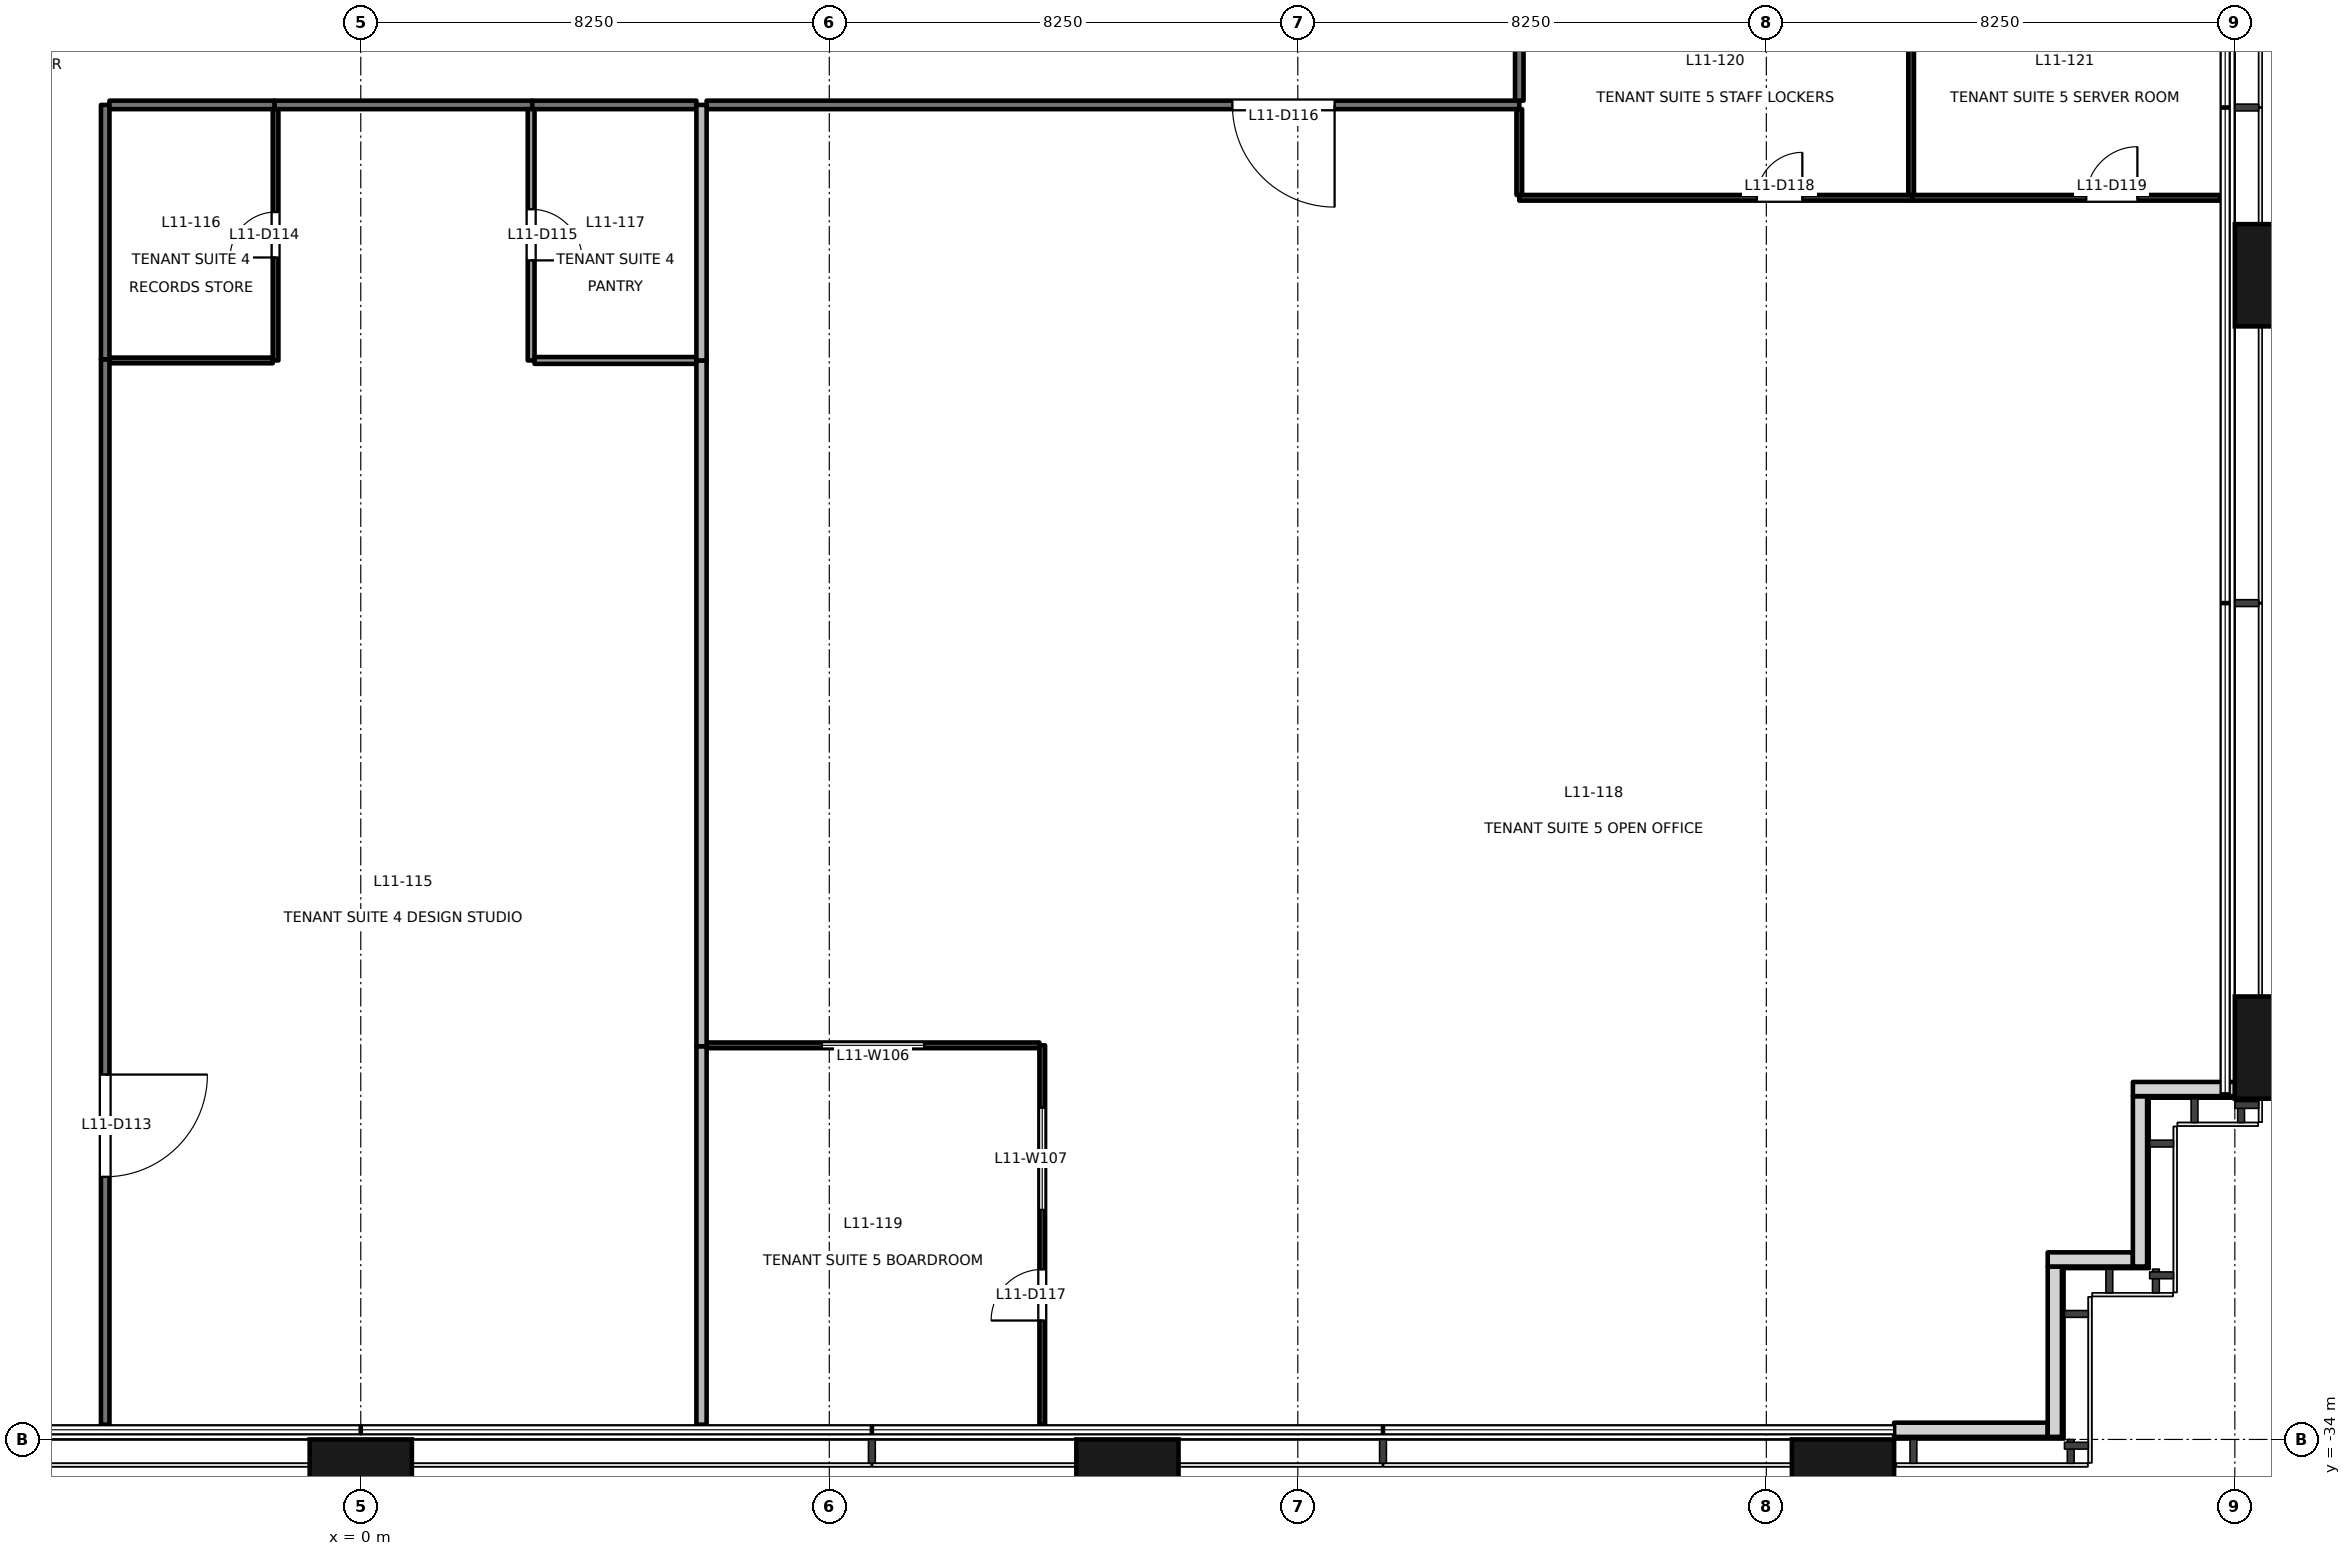
"""IFC4 building model, lengths in metres.
Left out: names, types, materials, properties, quantities, classifications, styles, units other than length and angle.
Written with IfcOpenShell. Run it as: python <this file> out.ifc"""

import sys

from ifc_helpers import new_model, si_unit, direction, frame, frame_2d, origin, origin_2d, place, context, subcontext, project, spatial, rectangle, extrude, element, fill, save


model = new_model("IFC4")
c1 = context("Model", 3, precision=1e-05, world=origin(), true_north=direction((0.0, 1.0)))
c2 = subcontext(c1, "Body", "Model", "MODEL_VIEW")
j1 = project(units=[si_unit("LENGTHUNIT", "METRE"), si_unit("PLANEANGLEUNIT", "RADIAN")], contexts=[c1])
p1 = place(None, origin())
s1 = spatial("IfcSite", under=j1, at=p1, CompositionType="ELEMENT")
p2 = place(p1, origin())
s2 = spatial("IfcBuilding", under=s1, at=p2, CompositionType="ELEMENT")
p3 = place(p2, frame((0.0, 0.0, 52.9)))
s3 = spatial("IfcBuildingStorey", under=s2, at=p3, CompositionType="ELEMENT", Elevation=52.9)
for number, where, z_axis, x_axis in (
    (1, (0.0, -34.9, -0.2), (0.0, 0.0, 1.0), (1.0, 0.0, 0.0)),
    (2, (13.5, -34.9, -0.2), (0.0, 0.0, 1.0), (1.0, 0.0, 0.0)),
    (3, (26.1, -34.9, -0.2), (0.0, 0.0, 1.0), (1.0, 0.0, 0.0)),
    (4, (33.9, -27.1, -0.2), (0.0, 0.0, 1.0), (0.0, 1.0, 0.0)),
    (5, (33.9, -13.5, -0.2), (0.0, 0.0, 1.0), (0.0, 1.0, 0.0)),
):
    element("IfcColumn", number, at=place(p3, frame(where, z_axis=z_axis, x_axis=x_axis)), inside=s3, PredefinedType="COLUMN", context=c2, shape_type="SweptSolid", body=[
        extrude(rectangle(XDim=1.8, YDim=1.8, at=origin_2d()), origin(), (0.0, 0.0, 1.0), 4.1),
    ])
p4 = place(p3, frame((27.0, -33.83, 0.0), z_axis=(0.0, 0.0, 1.0), x_axis=(1.0, 0.0, 0.0)))
e6 = element("IfcWall", 6, at=p4, inside=s3, PredefinedType="SOLIDWALL", context=c2, shape_type="SweptSolid", body=[
    extrude(rectangle(XDim=2.705, YDim=0.25, at=frame_2d((1.353, 0.0))), origin(), (0.0, 0.0, 1.0), 3.9),
])
p5 = place(p3, frame((29.83, -33.955, 0.0), z_axis=(0.0, 0.0, 1.0), x_axis=(0.0, 1.0, 0.0)))
e7 = element("IfcWall", 7, at=p5, inside=s3, PredefinedType="SOLIDWALL", context=c2, shape_type="SweptSolid", body=[
    extrude(rectangle(XDim=3.0, YDim=0.25, at=frame_2d((1.5, 0.0))), origin(), (0.0, 0.0, 1.0), 3.9),
])
p6 = place(p3, frame((29.705, -30.83, 0.0), z_axis=(0.0, 0.0, 1.0), x_axis=(1.0, 0.0, 0.0)))
e8 = element("IfcWall", 8, at=p6, inside=s3, PredefinedType="SOLIDWALL", context=c2, shape_type="SweptSolid", body=[
    extrude(rectangle(XDim=1.5, YDim=0.25, at=frame_2d((0.75, 0.0))), origin(), (0.0, 0.0, 1.0), 3.9),
])
p7 = place(p3, frame((31.33, -30.955, 0.0), z_axis=(0.0, 0.0, 1.0), x_axis=(0.0, 1.0, 0.0)))
e9 = element("IfcWall", 9, at=p7, inside=s3, PredefinedType="SOLIDWALL", context=c2, shape_type="SweptSolid", body=[
    extrude(rectangle(XDim=3.0, YDim=0.25, at=frame_2d((1.5, 0.0))), origin(), (0.0, 0.0, 1.0), 3.9),
])
p8 = place(p3, frame((31.205, -27.83, 0.0), z_axis=(0.0, 0.0, 1.0), x_axis=(1.0, 0.0, 0.0)))
e10 = element("IfcWall", 10, at=p8, inside=s3, PredefinedType="SOLIDWALL", context=c2, shape_type="SweptSolid", body=[
    extrude(rectangle(XDim=1.8, YDim=0.25, at=frame_2d((0.9, 0.0))), origin(), (0.0, 0.0, 1.0), 3.9),
])
p9 = place(p3, frame((-4.5, -14.98, 0.0), z_axis=(0.0, 0.0, 1.0), x_axis=(0.0, -1.0, 0.0)))
e11 = element("IfcWall", 11, at=p9, inside=s3, PredefinedType="PARTITIONING", context=c2, shape_type="SweptSolid", body=[
    extrude(rectangle(XDim=18.76, YDim=0.15, at=frame_2d((9.38, 0.0))), origin(), (0.0, 0.0, 1.0), 2.9),
])
p10 = place(p9, frame((12.595, 0.0, 0.0)))
e12 = element("IfcOpeningElement", 12, at=p10, cuts=e11, PredefinedType="OPENING", context=c2, shape_type="SweptSolid", body=[
    extrude(rectangle(XDim=1.8, YDim=2.1, at=frame_2d((0.9, 1.05))), frame((0.0, 0.085, 0.0), z_axis=(0.0, -1.0, 0.0), x_axis=(1.0, 0.0, 0.0)), (0.0, 0.0, 1.0), 0.171),
])
p11 = place(p3, frame((3.02, -10.5, 0.0), z_axis=(0.0, 0.0, 1.0), x_axis=(-1.0, 0.0, 0.0)))
e13 = element("IfcWall", 13, at=p11, inside=s3, PredefinedType="PARTITIONING", context=c2, shape_type="SweptSolid", body=[
    extrude(rectangle(XDim=4.54, YDim=0.15, at=frame_2d((2.27, 0.0))), origin(), (0.0, 0.0, 1.0), 2.9),
])
p12 = place(p3, frame((-4.5, -10.5, 0.0), z_axis=(0.0, 0.0, 1.0), x_axis=(0.0, -1.0, 0.0)))
e14 = element("IfcWall", 14, at=p12, inside=s3, PredefinedType="PARTITIONING", context=c2, shape_type="SweptSolid", body=[
    extrude(rectangle(XDim=4.48, YDim=0.15, at=frame_2d((2.24, 0.0))), origin(), (0.0, 0.0, 1.0), 2.9),
])
p13 = place(p3, frame((-1.52, -10.5, 0.0), z_axis=(0.0, 0.0, 1.0), x_axis=(-1.0, 0.0, 0.0)))
e15 = element("IfcWall", 15, at=p13, inside=s3, PredefinedType="PARTITIONING", context=c2, shape_type="SweptSolid", body=[
    extrude(rectangle(XDim=2.905, YDim=0.15, at=frame_2d((1.453, 0.0))), origin(), (0.0, 0.0, 1.0), 2.9),
])
p14 = place(p3, frame((5.91, -10.5, 0.0), z_axis=(0.0, 0.0, 1.0), x_axis=(-1.0, 0.0, 0.0)))
e16 = element("IfcWall", 16, at=p14, inside=s3, PredefinedType="PARTITIONING", context=c2, shape_type="SweptSolid", body=[
    extrude(rectangle(XDim=2.89, YDim=0.15, at=frame_2d((1.445, 0.0))), origin(), (0.0, 0.0, 1.0), 2.9),
])
p15 = place(p3, frame((20.4, -10.5, 0.0), z_axis=(0.0, 0.0, 1.0), x_axis=(-1.0, 0.0, 0.0)))
e17 = element("IfcWall", 17, at=p15, inside=s3, PredefinedType="PARTITIONING", context=c2, shape_type="SweptSolid", body=[
    extrude(rectangle(XDim=14.31, YDim=0.15, at=frame_2d((7.155, 0.0))), origin(), (0.0, 0.0, 1.0), 2.5),
])
p16 = place(p15, frame((3.252, 0.0, 0.0)))
e18 = element("IfcOpeningElement", 18, at=p16, cuts=e17, PredefinedType="OPENING", context=c2, shape_type="SweptSolid", body=[
    extrude(rectangle(XDim=1.8, YDim=2.1, at=frame_2d((0.9, 1.05))), frame((0.0, 0.085, 0.0), z_axis=(0.0, -1.0, 0.0), x_axis=(1.0, 0.0, 0.0)), (0.0, 0.0, 1.0), 0.171),
])
p17 = place(p3, frame((20.4, -7.726, 0.0), z_axis=(0.0, 0.0, 1.0), x_axis=(0.0, -1.0, 0.0)))
e19 = element("IfcWall", 19, at=p17, inside=s3, PredefinedType="PARTITIONING", context=c2, shape_type="SweptSolid", body=[
    extrude(rectangle(XDim=2.699, YDim=0.15, at=frame_2d((1.35, 0.0))), origin(), (0.0, 0.0, 1.0), 3.3),
])
p18 = place(p3, frame((-4.425, -15.0, 0.0), z_axis=(0.0, 0.0, 1.0), x_axis=(1.0, 0.0, 0.0)))
e20 = element("IfcWall", 20, at=p18, inside=s3, PredefinedType="PARTITIONING", context=c2, shape_type="SweptSolid", body=[
    extrude(rectangle(XDim=2.875, YDim=0.1, at=frame_2d((1.438, 0.0))), origin(), (0.0, 0.0, 1.0), 2.9),
])
p19 = place(p3, frame((-1.5, -15.0, 0.0), z_axis=(0.0, 0.0, 1.0), x_axis=(0.0, 1.0, 0.0)))
e21 = element("IfcWall", 21, at=p19, inside=s3, PredefinedType="PARTITIONING", context=c2, shape_type="SweptSolid", body=[
    extrude(rectangle(XDim=4.425, YDim=0.1, at=frame_2d((2.212, 0.0))), origin(), (0.0, 0.0, 1.0), 3.9),
])
p20 = place(p19, frame((1.813, 0.0, 0.0)))
e22 = element("IfcOpeningElement", 22, at=p20, cuts=e21, PredefinedType="OPENING", context=c2, shape_type="SweptSolid", body=[
    extrude(rectangle(XDim=0.8, YDim=2.1, at=frame_2d((0.4, 1.05))), frame((0.0, 0.061, 0.0), z_axis=(0.0, -1.0, 0.0), x_axis=(1.0, 0.0, 0.0)), (0.0, 0.0, 1.0), 0.121),
])
p21 = place(p3, frame((3.0, -10.575, 0.0), z_axis=(0.0, 0.0, 1.0), x_axis=(0.0, -1.0, 0.0)))
e23 = element("IfcWall", 23, at=p21, inside=s3, PredefinedType="PARTITIONING", context=c2, shape_type="SweptSolid", body=[
    extrude(rectangle(XDim=4.425, YDim=0.12, at=frame_2d((2.212, 0.0))), origin(), (0.0, 0.0, 1.0), 3.9),
])
p22 = place(p21, frame((1.763, 0.0, 0.0)))
e24 = element("IfcOpeningElement", 24, at=p22, cuts=e23, PredefinedType="OPENING", context=c2, shape_type="SweptSolid", body=[
    extrude(rectangle(XDim=0.9, YDim=2.1, at=frame_2d((0.45, 1.05))), frame((0.0, 0.071, 0.0), z_axis=(0.0, -1.0, 0.0), x_axis=(1.0, 0.0, 0.0)), (0.0, 0.0, 1.0), 0.141),
])
p23 = place(p3, frame((3.06, -15.0, 0.0), z_axis=(0.0, 0.0, 1.0), x_axis=(1.0, 0.0, 0.0)))
e25 = element("IfcWall", 25, at=p23, inside=s3, PredefinedType="PARTITIONING", context=c2, shape_type="SweptSolid", body=[
    extrude(rectangle(XDim=2.85, YDim=0.12, at=frame_2d((1.425, 0.0))), origin(), (0.0, 0.0, 1.0), 2.9),
])
p24 = place(p3, frame((6.0, -15.0, 0.0), z_axis=(0.0, 0.0, 1.0), x_axis=(0.0, -1.0, 0.0)))
e26 = element("IfcWall", 26, at=p24, inside=s3, PredefinedType="PARTITIONING", context=c2, shape_type="SweptSolid", body=[
    extrude(rectangle(XDim=12.08, YDim=0.18, at=frame_2d((6.04, 0.0))), origin(), (0.0, 0.0, 1.0), 3.9),
])
p25 = place(p3, frame((6.0, -27.08, 0.0), z_axis=(0.0, 0.0, 1.0), x_axis=(0.0, -1.0, 0.0)))
e27 = element("IfcWall", 27, at=p25, inside=s3, PredefinedType="PARTITIONING", context=c2, shape_type="SweptSolid", body=[
    extrude(rectangle(XDim=6.66, YDim=0.18, at=frame_2d((3.33, 0.0))), origin(), (0.0, 0.0, 1.0), 3.9),
])
p26 = place(p3, frame((6.0, -10.5, 0.0), z_axis=(0.0, 0.0, 1.0), x_axis=(0.0, -1.0, 0.0)))
e28 = element("IfcWall", 28, at=p26, inside=s3, PredefinedType="PARTITIONING", context=c2, shape_type="SweptSolid", body=[
    extrude(rectangle(XDim=4.5, YDim=0.18, at=frame_2d((2.25, 0.0))), origin(), (0.0, 0.0, 1.0), 3.9),
])
p27 = place(p3, frame((11.95, -27.06, 0.0), z_axis=(0.0, 0.0, 1.0), x_axis=(-1.0, 0.0, 0.0)))
e29 = element("IfcWall", 29, at=p27, inside=s3, PredefinedType="PARTITIONING", context=c2, shape_type="SweptSolid", body=[
    extrude(rectangle(XDim=5.86, YDim=0.1, at=frame_2d((2.93, 0.0))), origin(), (0.0, 0.0, 1.0), 2.9),
])
p28 = place(p27, frame((2.03, 0.0, 0.9)))
e30 = element("IfcOpeningElement", 30, at=p28, cuts=e29, PredefinedType="OPENING", context=c2, shape_type="SweptSolid", body=[
    extrude(rectangle(XDim=1.8, YDim=1.2, at=frame_2d((0.9, 0.6))), frame((0.0, 0.061, 0.0), z_axis=(0.0, -1.0, 0.0), x_axis=(1.0, 0.0, 0.0)), (0.0, 0.0, 1.0), 0.121),
])
p29 = place(p3, frame((12.0, -33.74, 0.0), z_axis=(0.0, 0.0, 1.0), x_axis=(0.0, 1.0, 0.0)))
e31 = element("IfcWall", 31, at=p29, inside=s3, PredefinedType="PARTITIONING", context=c2, shape_type="SweptSolid", body=[
    extrude(rectangle(XDim=6.68, YDim=0.1, at=frame_2d((3.34, 0.0))), origin(), (0.0, 0.0, 1.0), 3.9),
])
p30 = place(p29, frame((1.834, 0.0, 0.0)))
e32 = element("IfcOpeningElement", 32, at=p30, cuts=e31, PredefinedType="OPENING", context=c2, shape_type="SweptSolid", body=[
    extrude(rectangle(XDim=0.9, YDim=2.1, at=frame_2d((0.45, 1.05))), frame((0.0, 0.061, 0.0), z_axis=(0.0, -1.0, 0.0), x_axis=(1.0, 0.0, 0.0)), (0.0, 0.0, 1.0), 0.121),
])
p31 = place(p29, frame((3.782, 0.0, 0.9)))
e33 = element("IfcOpeningElement", 33, at=p31, cuts=e31, PredefinedType="OPENING", context=c2, shape_type="SweptSolid", body=[
    extrude(rectangle(XDim=1.8, YDim=1.2, at=frame_2d((0.9, 0.6))), frame((0.0, 0.061, 0.0), z_axis=(0.0, -1.0, 0.0), x_axis=(1.0, 0.0, 0.0)), (0.0, 0.0, 1.0), 0.121),
])
p32 = place(p3, frame((20.4, -12.136, 0.0), z_axis=(0.0, 0.0, 1.0), x_axis=(1.0, 0.0, 0.0)))
e34 = element("IfcWall", 34, at=p32, inside=s3, PredefinedType="PARTITIONING", context=c2, shape_type="SweptSolid", body=[
    extrude(rectangle(XDim=6.92, YDim=0.1, at=frame_2d((3.46, 0.0))), origin(), (0.0, 0.0, 1.0), 3.9),
])
p33 = place(p32, frame((4.184, 0.0, 0.0)))
e35 = element("IfcOpeningElement", 35, at=p33, cuts=e34, PredefinedType="OPENING", context=c2, shape_type="SweptSolid", body=[
    extrude(rectangle(XDim=0.8, YDim=2.1, at=frame_2d((0.4, 1.05))), frame((0.0, 0.061, 0.0), z_axis=(0.0, -1.0, 0.0), x_axis=(1.0, 0.0, 0.0)), (0.0, 0.0, 1.0), 0.121),
])
p34 = place(p3, frame((20.4, -10.575, 0.0), z_axis=(0.0, 0.0, 1.0), x_axis=(0.0, -1.0, 0.0)))
e36 = element("IfcWall", 36, at=p34, inside=s3, PredefinedType="PARTITIONING", context=c2, shape_type="SweptSolid", body=[
    extrude(rectangle(XDim=1.511, YDim=0.1, at=frame_2d((0.755, 0.0))), origin(), (0.0, 0.0, 1.0), 3.9),
])
p35 = place(p3, frame((27.32, -12.136, 0.0), z_axis=(0.0, 0.0, 1.0), x_axis=(1.0, 0.0, 0.0)))
e37 = element("IfcWall", 37, at=p35, inside=s3, PredefinedType="PARTITIONING", context=c2, shape_type="SweptSolid", body=[
    extrude(rectangle(XDim=5.42, YDim=0.1, at=frame_2d((2.71, 0.0))), origin(), (0.0, 0.0, 1.0), 3.9),
])
p36 = place(p35, frame((3.064, 0.0, 0.0)))
e38 = element("IfcOpeningElement", 38, at=p36, cuts=e37, PredefinedType="OPENING", context=c2, shape_type="SweptSolid", body=[
    extrude(rectangle(XDim=0.9, YDim=2.1, at=frame_2d((0.45, 1.05))), frame((0.0, 0.061, 0.0), z_axis=(0.0, -1.0, 0.0), x_axis=(1.0, 0.0, 0.0)), (0.0, 0.0, 1.0), 0.121),
])
p37 = place(p3, frame((27.3, -7.726, 0.0), z_axis=(0.0, 0.0, 1.0), x_axis=(0.0, -1.0, 0.0)))
e39 = element("IfcWall", 39, at=p37, inside=s3, PredefinedType="PARTITIONING", context=c2, shape_type="SweptSolid", body=[
    extrude(rectangle(XDim=4.36, YDim=0.1, at=frame_2d((2.18, 0.0))), origin(), (0.0, 0.0, 1.0), 3.3),
])
p38 = place(p10, origin())
e40 = element("IfcDoor", 40, at=p38, inside=s3, OperationType="DOUBLE_DOOR_SINGLE_SWING", PredefinedType="DOOR", context=c2, shape_type="SweptSolid", body=[
    extrude(rectangle(XDim=1.8, YDim=2.1, at=frame_2d((0.9, 1.05))), frame((0.0, 0.025, 0.0), z_axis=(0.0, -1.0, 0.0), x_axis=(1.0, 0.0, 0.0)), (0.0, 0.0, 1.0), 0.05),
])
fill(e12, e40)
p39 = place(p20, origin())
e41 = element("IfcDoor", 41, at=p39, inside=s3, OperationType="SINGLE_SWING_LEFT", PredefinedType="DOOR", context=c2, shape_type="SweptSolid", body=[
    extrude(rectangle(XDim=0.8, YDim=2.1, at=frame_2d((0.4, 1.05))), frame((0.0, 0.025, 0.0), z_axis=(0.0, -1.0, 0.0), x_axis=(1.0, 0.0, 0.0)), (0.0, 0.0, 1.0), 0.05),
])
fill(e22, e41)
p40 = place(p22, origin())
e42 = element("IfcDoor", 42, at=p40, inside=s3, OperationType="SINGLE_SWING_RIGHT", PredefinedType="DOOR", context=c2, shape_type="SweptSolid", body=[
    extrude(rectangle(XDim=0.9, YDim=2.1, at=frame_2d((0.45, 1.05))), frame((0.0, 0.025, 0.0), z_axis=(0.0, -1.0, 0.0), x_axis=(1.0, 0.0, 0.0)), (0.0, 0.0, 1.0), 0.05),
])
fill(e24, e42)
p41 = place(p16, origin())
e43 = element("IfcDoor", 43, at=p41, inside=s3, OperationType="DOUBLE_DOOR_SINGLE_SWING", PredefinedType="DOOR", context=c2, shape_type="SweptSolid", body=[
    extrude(rectangle(XDim=1.8, YDim=2.1, at=frame_2d((0.9, 1.05))), frame((0.0, 0.025, 0.0), z_axis=(0.0, -1.0, 0.0), x_axis=(1.0, 0.0, 0.0)), (0.0, 0.0, 1.0), 0.05),
])
fill(e18, e43)
p42 = place(p30, origin())
e44 = element("IfcDoor", 44, at=p42, inside=s3, OperationType="SINGLE_SWING_LEFT", PredefinedType="DOOR", context=c2, shape_type="SweptSolid", body=[
    extrude(rectangle(XDim=0.9, YDim=2.1, at=frame_2d((0.45, 1.05))), frame((0.0, 0.025, 0.0), z_axis=(0.0, -1.0, 0.0), x_axis=(1.0, 0.0, 0.0)), (0.0, 0.0, 1.0), 0.05),
])
fill(e32, e44)
p43 = place(p33, origin())
e45 = element("IfcDoor", 45, at=p43, inside=s3, OperationType="SINGLE_SWING_RIGHT", PredefinedType="DOOR", context=c2, shape_type="SweptSolid", body=[
    extrude(rectangle(XDim=0.8, YDim=2.1, at=frame_2d((0.4, 1.05))), frame((0.0, 0.025, 0.0), z_axis=(0.0, -1.0, 0.0), x_axis=(1.0, 0.0, 0.0)), (0.0, 0.0, 1.0), 0.05),
])
fill(e35, e45)
p44 = place(p36, origin())
e46 = element("IfcDoor", 46, at=p44, inside=s3, OperationType="SINGLE_SWING_RIGHT", PredefinedType="DOOR", context=c2, shape_type="SweptSolid", body=[
    extrude(rectangle(XDim=0.9, YDim=2.1, at=frame_2d((0.45, 1.05))), frame((0.0, 0.025, 0.0), z_axis=(0.0, -1.0, 0.0), x_axis=(1.0, 0.0, 0.0)), (0.0, 0.0, 1.0), 0.05),
])
fill(e38, e46)
p45 = place(p28, origin())
e47 = element("IfcWindow", 47, at=p45, inside=s3, PartitioningType="SINGLE_PANEL", PredefinedType="WINDOW", context=c2, shape_type="SweptSolid", body=[
    extrude(rectangle(XDim=1.8, YDim=1.2, at=frame_2d((0.9, 0.6))), frame((0.0, 0.03, 0.0), z_axis=(0.0, -1.0, 0.0), x_axis=(1.0, 0.0, 0.0)), (0.0, 0.0, 1.0), 0.06),
])
fill(e30, e47)
p46 = place(p31, origin())
e48 = element("IfcWindow", 48, at=p46, inside=s3, PartitioningType="SINGLE_PANEL", PredefinedType="WINDOW", context=c2, shape_type="SweptSolid", body=[
    extrude(rectangle(XDim=1.8, YDim=1.2, at=frame_2d((0.9, 0.6))), frame((0.0, 0.03, 0.0), z_axis=(0.0, -1.0, 0.0), x_axis=(1.0, 0.0, 0.0)), (0.0, 0.0, 1.0), 0.06),
])
fill(e33, e48)
save(model, sys.argv[1])
